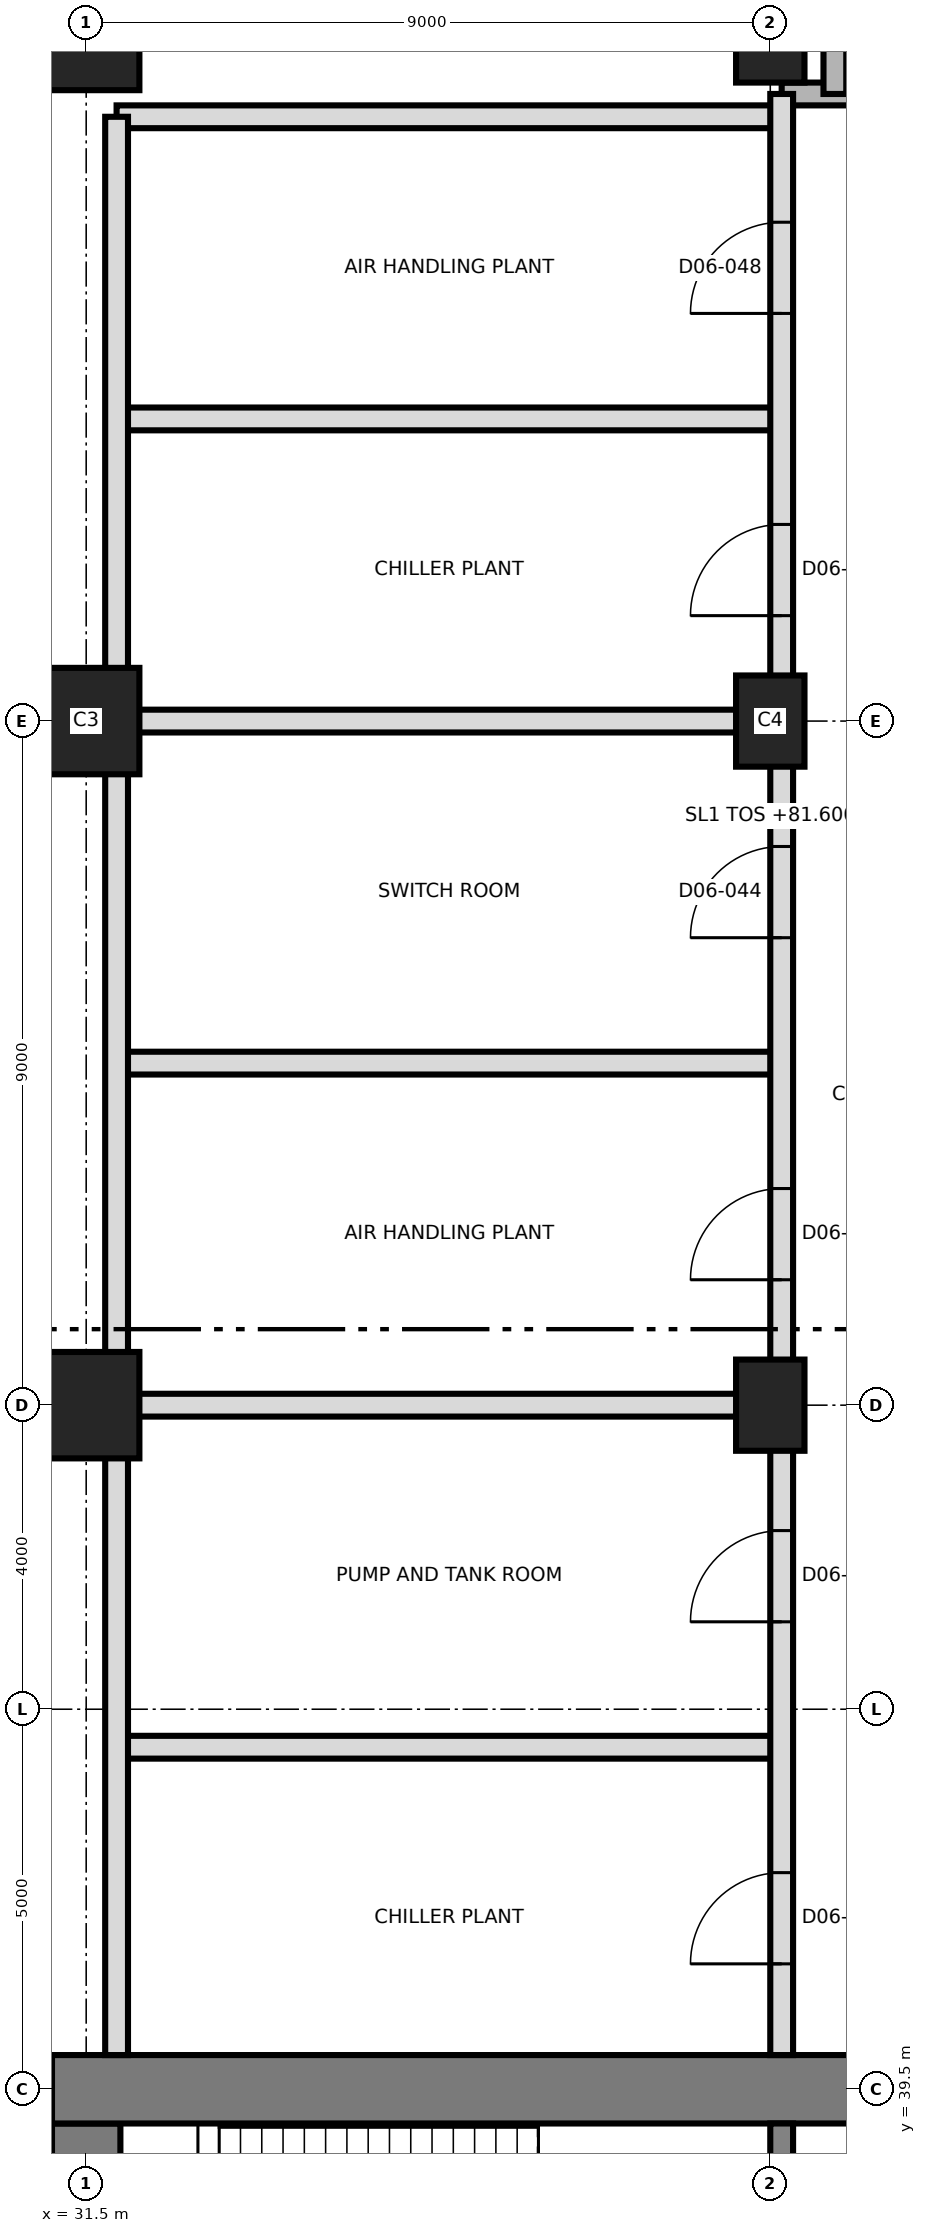
"""IFC4 building model, lengths in metres.
Left out: names, types, materials, properties, quantities, classifications, styles, units other than length and angle.
Written with IfcOpenShell. Run it as: python <this file> out.ifc"""

import sys

from ifc_helpers import new_model, si_unit, direction, frame, frame_2d, origin, origin_2d, place, context, subcontext, project, spatial, rectangle, extrude, element, fill, save


model = new_model("IFC4")
c1 = context("Model", 3, precision=1e-05, world=origin(), true_north=direction((0.0, 1.0)))
c2 = subcontext(c1, "Body", "Model", "MODEL_VIEW")
j1 = project(units=[si_unit("LENGTHUNIT", "METRE"), si_unit("PLANEANGLEUNIT", "RADIAN")], contexts=[c1])
p1 = place(None, origin())
s1 = spatial("IfcSite", under=j1, at=p1, CompositionType="ELEMENT")
p2 = place(p1, origin())
s2 = spatial("IfcBuilding", under=s1, at=p2, CompositionType="ELEMENT")
p3 = place(p2, frame((0.0, 0.0, 81.6)))
s3 = spatial("IfcBuildingStorey", under=s2, at=p3, CompositionType="ELEMENT", Elevation=81.6)
p4 = place(p3, frame((31.5, 21.95, 0.0), z_axis=(0.0, 0.0, 1.0), x_axis=(0.0, 1.0, 0.0)))
e1 = element("IfcWall", 1, at=p4, inside=s3, PredefinedType="SHEAR", context=c2, shape_type="SweptSolid", body=[
    extrude(rectangle(XDim=17.1, YDim=0.9, at=frame_2d((8.55, 0.0))), origin(), (0.0, 0.0, 1.0), 5.5),
])
p5 = place(p3, frame((31.05, 39.5, 0.0), z_axis=(0.0, 0.0, 1.0), x_axis=(1.0, 0.0, 0.0)))
e2 = element("IfcWall", 2, at=p5, inside=s3, PredefinedType="SHEAR", context=c2, shape_type="SweptSolid", body=[
    extrude(rectangle(XDim=27.0, YDim=0.9, at=frame_2d((13.5, 0.0))), origin(), (0.0, 0.0, 1.0), 5.5),
])
p6 = place(p5, frame((10.65, 0.0, 0.0)))
e3 = element("IfcOpeningElement", 3, at=p6, cuts=e2, PredefinedType="OPENING", context=c2, shape_type="SweptSolid", body=[
    extrude(rectangle(XDim=1.2, YDim=2.1, at=frame_2d((0.6, 1.05))), frame((0.0, 0.46, 0.0), z_axis=(0.0, -1.0, 0.0), x_axis=(1.0, 0.0, 0.0)), (0.0, 0.0, 1.0), 0.92),
])
p7 = place(p3, frame((40.65, 33.5, 0.0), z_axis=(0.0, 0.0, 1.0), x_axis=(0.0, 1.0, 0.0)))
e4 = element("IfcWall", 4, at=p7, inside=s3, PredefinedType="SHEAR", context=c2, shape_type="SweptSolid", body=[
    extrude(rectangle(XDim=5.55, YDim=0.3, at=frame_2d((2.775, 0.0))), origin(), (0.0, 0.0, 1.0), 5.5),
])
p8 = place(p3, frame((31.5, 48.5, 0.0), z_axis=(0.0, 0.0, 1.0), x_axis=(1.0, 0.0, 0.0)))
e5 = element("IfcColumn", 5, at=p8, inside=s3, PredefinedType="COLUMN", context=c2, shape_type="SweptSolid", body=[
    extrude(rectangle(XDim=1.4, YDim=1.4, at=origin_2d()), origin(), (0.0, 0.0, 1.0), 5.5),
])
p9 = place(p3, frame((40.5, 48.5, 0.0), z_axis=(0.0, 0.0, 1.0), x_axis=(0.0, 1.0, 0.0)))
e6 = element("IfcColumn", 6, at=p9, inside=s3, PredefinedType="COLUMN", context=c2, shape_type="SweptSolid", body=[
    extrude(rectangle(XDim=1.2, YDim=0.9, at=origin_2d()), origin(), (0.0, 0.0, 1.0), 5.5),
])
p10 = place(p3, frame((31.5, 57.5, 0.0), z_axis=(0.0, 0.0, 1.0), x_axis=(1.0, 0.0, 0.0)))
e7 = element("IfcColumn", 7, at=p10, inside=s3, PredefinedType="COLUMN", context=c2, shape_type="SweptSolid", body=[
    extrude(rectangle(XDim=1.4, YDim=1.4, at=origin_2d()), origin(), (0.0, 0.0, 1.0), 5.5),
])
p11 = place(p3, frame((40.5, 57.5, 0.0), z_axis=(0.0, 0.0, 1.0), x_axis=(0.0, 1.0, 0.0)))
e8 = element("IfcColumn", 8, at=p11, inside=s3, PredefinedType="COLUMN", context=c2, shape_type="SweptSolid", body=[
    extrude(rectangle(XDim=1.2, YDim=0.9, at=origin_2d()), origin(), (0.0, 0.0, 1.0), 5.5),
])
p12 = place(p3, frame((31.5, 66.5, 0.0), z_axis=(0.0, 0.0, 1.0), x_axis=(1.0, 0.0, 0.0)))
e9 = element("IfcColumn", 9, at=p12, inside=s3, PredefinedType="COLUMN", context=c2, shape_type="SweptSolid", body=[
    extrude(rectangle(XDim=1.4, YDim=1.4, at=origin_2d()), origin(), (0.0, 0.0, 1.0), 5.5),
])
p13 = place(p3, frame((40.5, 66.5, 0.0), z_axis=(0.0, 0.0, 1.0), x_axis=(0.0, 1.0, 0.0)))
e10 = element("IfcColumn", 10, at=p13, inside=s3, PredefinedType="COLUMN", context=c2, shape_type="SweptSolid", body=[
    extrude(rectangle(XDim=1.2, YDim=0.9, at=origin_2d()), origin(), (0.0, 0.0, 1.0), 5.5),
])
for number, where, z_axis, x_axis in (
    (11, (31.9, 44.0, 0.0), (0.0, 0.0, 1.0), (1.0, 0.0, 0.0)),
    (12, (31.9, 48.5, 0.0), (0.0, 0.0, 1.0), (1.0, 0.0, 0.0)),
    (13, (31.9, 53.0, 0.0), (0.0, 0.0, 1.0), (1.0, 0.0, 0.0)),
    (14, (31.9, 57.5, 0.0), (0.0, 0.0, 1.0), (1.0, 0.0, 0.0)),
    (15, (31.9, 61.475, 0.0), (0.0, 0.0, 1.0), (1.0, 0.0, 0.0)),
    (16, (31.9, 65.45, 0.0), (0.0, 0.0, 1.0), (1.0, 0.0, 0.0)),
):
    element("IfcWall", number, at=place(p3, frame(where, z_axis=z_axis, x_axis=x_axis)), inside=s3, PredefinedType="PARTITIONING", context=c2, shape_type="SweptSolid", body=[
        extrude(rectangle(XDim=8.75, YDim=0.3, at=frame_2d((4.375, 0.0))), origin(), (0.0, 0.0, 1.0), 5.2),
    ])
p14 = place(p3, frame((40.65, 65.75, 0.0), z_axis=(0.0, 0.0, 1.0), x_axis=(1.0, 0.0, 0.0)))
e17 = element("IfcWall", 17, at=p14, inside=s3, PredefinedType="SHEAR", context=c2, shape_type="SweptSolid", body=[
    extrude(rectangle(XDim=3.7, YDim=0.3, at=frame_2d((1.85, 0.0))), origin(), (0.0, 0.0, 1.0), 5.2),
])
p15 = place(p14, frame((1.1, 0.0, 0.0)))
e18 = element("IfcOpeningElement", 18, at=p15, cuts=e17, PredefinedType="OPENING", context=c2, shape_type="SweptSolid", body=[
    extrude(rectangle(XDim=1.2, YDim=2.1, at=frame_2d((0.6, 1.05))), frame((0.0, 0.16, 0.0), z_axis=(0.0, -1.0, 0.0), x_axis=(1.0, 0.0, 0.0)), (0.0, 0.0, 1.0), 0.32),
])
p16 = place(p3, frame((31.9, 39.95, 0.0), z_axis=(0.0, 0.0, 1.0), x_axis=(0.0, 1.0, 0.0)))
e19 = element("IfcWall", 19, at=p16, inside=s3, PredefinedType="PARTITIONING", context=c2, shape_type="SweptSolid", body=[
    extrude(rectangle(XDim=25.5, YDim=0.3, at=frame_2d((12.75, 0.0))), origin(), (0.0, 0.0, 1.0), 5.2),
])
p17 = place(p3, frame((40.65, 39.95, 0.0), z_axis=(0.0, 0.0, 1.0), x_axis=(0.0, 1.0, 0.0)))
e20 = element("IfcWall", 20, at=p17, inside=s3, PredefinedType="PARTITIONING", context=c2, shape_type="SweptSolid", body=[
    extrude(rectangle(XDim=25.8, YDim=0.3, at=frame_2d((12.9, 0.0))), origin(), (0.0, 0.0, 1.0), 5.2),
])
p18 = place(p17, frame((1.2, 0.0, 0.0)))
e21 = element("IfcOpeningElement", 21, at=p18, cuts=e20, PredefinedType="OPENING", context=c2, shape_type="SweptSolid", body=[
    extrude(rectangle(XDim=1.2, YDim=2.1, at=frame_2d((0.6, 1.05))), frame((0.0, 0.16, 0.0), z_axis=(0.0, -1.0, 0.0), x_axis=(1.0, 0.0, 0.0)), (0.0, 0.0, 1.0), 0.32),
])
p19 = place(p17, frame((5.7, 0.0, 0.0)))
e22 = element("IfcOpeningElement", 22, at=p19, cuts=e20, PredefinedType="OPENING", context=c2, shape_type="SweptSolid", body=[
    extrude(rectangle(XDim=1.2, YDim=2.1, at=frame_2d((0.6, 1.05))), frame((0.0, 0.16, 0.0), z_axis=(0.0, -1.0, 0.0), x_axis=(1.0, 0.0, 0.0)), (0.0, 0.0, 1.0), 0.32),
])
p20 = place(p17, frame((10.2, 0.0, 0.0)))
e23 = element("IfcOpeningElement", 23, at=p20, cuts=e20, PredefinedType="OPENING", context=c2, shape_type="SweptSolid", body=[
    extrude(rectangle(XDim=1.2, YDim=2.1, at=frame_2d((0.6, 1.05))), frame((0.0, 0.16, 0.0), z_axis=(0.0, -1.0, 0.0), x_axis=(1.0, 0.0, 0.0)), (0.0, 0.0, 1.0), 0.32),
])
p21 = place(p17, frame((14.7, 0.0, 0.0)))
e24 = element("IfcOpeningElement", 24, at=p21, cuts=e20, PredefinedType="OPENING", context=c2, shape_type="SweptSolid", body=[
    extrude(rectangle(XDim=1.2, YDim=2.1, at=frame_2d((0.6, 1.05))), frame((0.0, 0.16, 0.0), z_axis=(0.0, -1.0, 0.0), x_axis=(1.0, 0.0, 0.0)), (0.0, 0.0, 1.0), 0.32),
])
p22 = place(p17, frame((18.937, 0.0, 0.0)))
e25 = element("IfcOpeningElement", 25, at=p22, cuts=e20, PredefinedType="OPENING", context=c2, shape_type="SweptSolid", body=[
    extrude(rectangle(XDim=1.2, YDim=2.1, at=frame_2d((0.6, 1.05))), frame((0.0, 0.16, 0.0), z_axis=(0.0, -1.0, 0.0), x_axis=(1.0, 0.0, 0.0)), (0.0, 0.0, 1.0), 0.32),
])
p23 = place(p17, frame((22.913, 0.0, 0.0)))
e26 = element("IfcOpeningElement", 26, at=p23, cuts=e20, PredefinedType="OPENING", context=c2, shape_type="SweptSolid", body=[
    extrude(rectangle(XDim=1.2, YDim=2.1, at=frame_2d((0.6, 1.05))), frame((0.0, 0.16, 0.0), z_axis=(0.0, -1.0, 0.0), x_axis=(1.0, 0.0, 0.0)), (0.0, 0.0, 1.0), 0.32),
])
p24 = place(p3, frame((41.35, 65.75, 0.0), z_axis=(0.0, 0.0, 1.0), x_axis=(0.0, 1.0, 0.0)))
e27 = element("IfcWall", 27, at=p24, inside=s3, PredefinedType="SHEAR", context=c2, shape_type="SweptSolid", body=[
    extrude(rectangle(XDim=8.85, YDim=0.3, at=frame_2d((4.425, 0.0))), origin(), (0.0, 0.0, 1.0), 5.2),
])
p25 = place(p18, origin())
e28 = element("IfcDoor", 28, at=p25, inside=s3, OperationType="SINGLE_SWING_RIGHT", PredefinedType="DOOR", context=c2, shape_type="SweptSolid", body=[
    extrude(rectangle(XDim=1.2, YDim=2.1, at=frame_2d((0.6, 1.05))), frame((0.0, 0.025, 0.0), z_axis=(0.0, -1.0, 0.0), x_axis=(1.0, 0.0, 0.0)), (0.0, 0.0, 1.0), 0.05),
])
fill(e21, e28)
p26 = place(p19, origin())
e29 = element("IfcDoor", 29, at=p26, inside=s3, OperationType="SINGLE_SWING_LEFT", PredefinedType="DOOR", context=c2, shape_type="SweptSolid", body=[
    extrude(rectangle(XDim=1.2, YDim=2.1, at=frame_2d((0.6, 1.05))), frame((0.0, 0.025, 0.0), z_axis=(0.0, -1.0, 0.0), x_axis=(1.0, 0.0, 0.0)), (0.0, 0.0, 1.0), 0.05),
])
fill(e22, e29)
p27 = place(p20, origin())
e30 = element("IfcDoor", 30, at=p27, inside=s3, OperationType="SINGLE_SWING_LEFT", PredefinedType="DOOR", context=c2, shape_type="SweptSolid", body=[
    extrude(rectangle(XDim=1.2, YDim=2.1, at=frame_2d((0.6, 1.05))), frame((0.0, 0.025, 0.0), z_axis=(0.0, -1.0, 0.0), x_axis=(1.0, 0.0, 0.0)), (0.0, 0.0, 1.0), 0.05),
])
fill(e23, e30)
p28 = place(p21, origin())
e31 = element("IfcDoor", 31, at=p28, inside=s3, OperationType="SINGLE_SWING_LEFT", PredefinedType="DOOR", context=c2, shape_type="SweptSolid", body=[
    extrude(rectangle(XDim=1.2, YDim=2.1, at=frame_2d((0.6, 1.05))), frame((0.0, 0.025, 0.0), z_axis=(0.0, -1.0, 0.0), x_axis=(1.0, 0.0, 0.0)), (0.0, 0.0, 1.0), 0.05),
])
fill(e24, e31)
p29 = place(p22, origin())
e32 = element("IfcDoor", 32, at=p29, inside=s3, OperationType="SINGLE_SWING_LEFT", PredefinedType="DOOR", context=c2, shape_type="SweptSolid", body=[
    extrude(rectangle(XDim=1.2, YDim=2.1, at=frame_2d((0.6, 1.05))), frame((0.0, 0.025, 0.0), z_axis=(0.0, -1.0, 0.0), x_axis=(1.0, 0.0, 0.0)), (0.0, 0.0, 1.0), 0.05),
])
fill(e25, e32)
p30 = place(p23, origin())
e33 = element("IfcDoor", 33, at=p30, inside=s3, OperationType="SINGLE_SWING_RIGHT", PredefinedType="DOOR", context=c2, shape_type="SweptSolid", body=[
    extrude(rectangle(XDim=1.2, YDim=2.1, at=frame_2d((0.6, 1.05))), frame((0.0, 0.025, 0.0), z_axis=(0.0, -1.0, 0.0), x_axis=(1.0, 0.0, 0.0)), (0.0, 0.0, 1.0), 0.05),
])
fill(e26, e33)
save(model, sys.argv[1])
